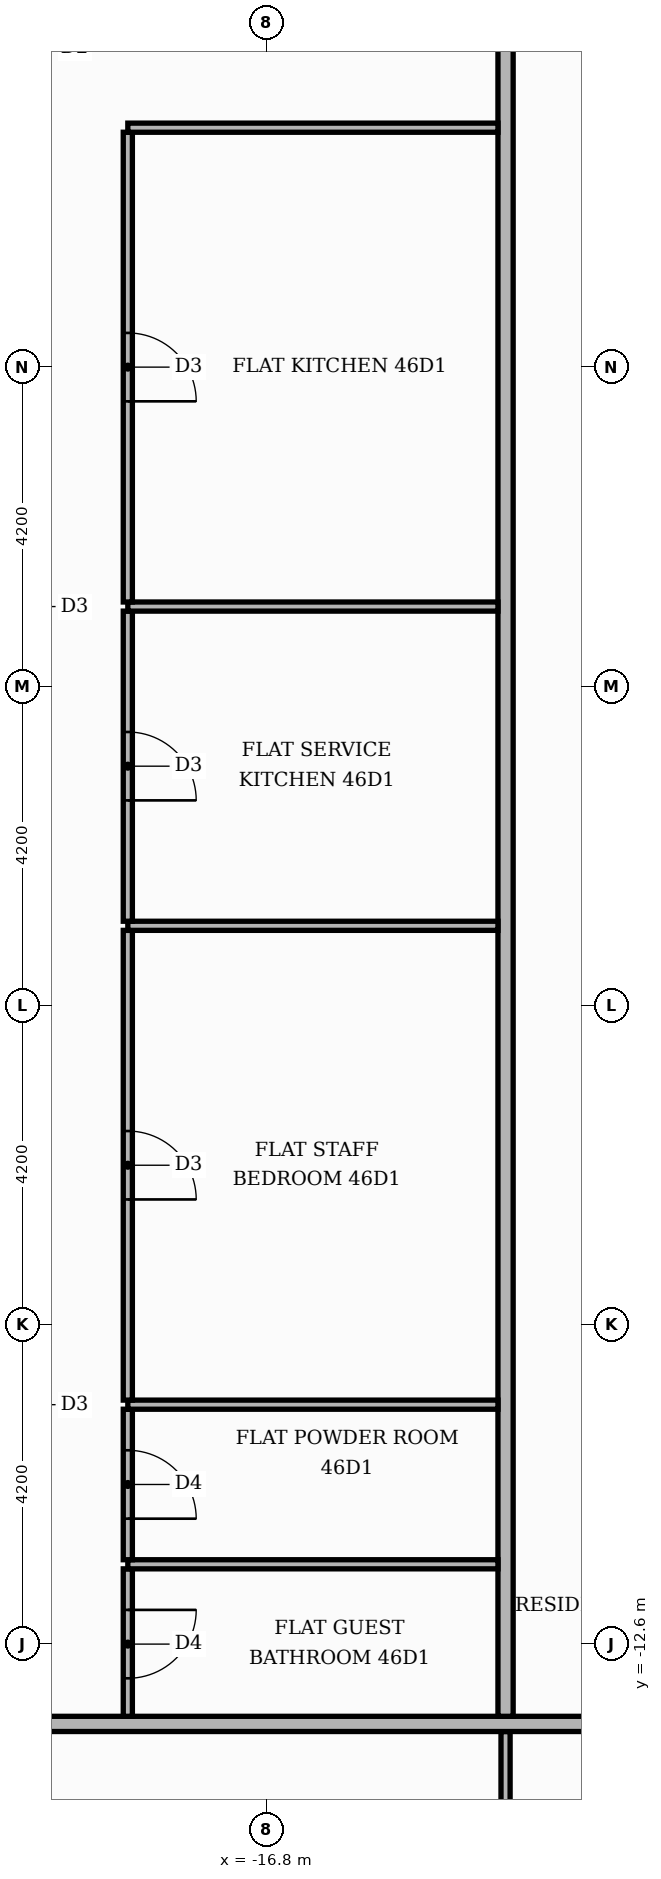
"""IFC4 building model, lengths in metres.
Left out: names, types, materials, properties, quantities, classifications, styles, units other than length and angle.
Written with IfcOpenShell. Run it as: python <this file> out.ifc"""

import sys

from ifc_helpers import new_model, si_unit, direction, frame, frame_2d, origin, place, context, subcontext, project, spatial, rectangle, extrude, element, fill, save


model = new_model("IFC4")
c1 = context("Model", 3, precision=1e-05, world=origin(), true_north=direction((0.0, 1.0)))
c2 = subcontext(c1, "Body", "Model", "MODEL_VIEW")
j1 = project(units=[si_unit("LENGTHUNIT", "METRE"), si_unit("PLANEANGLEUNIT", "RADIAN")], contexts=[c1])
p1 = place(None, origin())
s1 = spatial("IfcSite", under=j1, at=p1, CompositionType="ELEMENT")
p2 = place(p1, origin())
s2 = spatial("IfcBuilding", under=s1, at=p2, CompositionType="ELEMENT")
p3 = place(p2, frame((0.0, 0.0, 196.2)))
s3 = spatial("IfcBuildingStorey", under=s2, at=p3, CompositionType="ELEMENT", Elevation=196.2)
p4 = place(p3, frame((-13.65, -20.36, 0.0), z_axis=(0.0, 0.0, 1.0), x_axis=(0.0, 1.0, 0.0)))
e1 = element("IfcWall", 1, at=p4, inside=s3, PredefinedType="PARTITIONING", context=c2, shape_type="SweptSolid", body=[
    extrude(rectangle(XDim=6.61, YDim=0.12, at=frame_2d((3.305, 0.0))), origin(), (0.0, 0.0, 1.0), 3.48),
])
p5 = place(p4, frame((2.825, 0.0, 0.0)))
e2 = element("IfcOpeningElement", 2, at=p5, cuts=e1, PredefinedType="OPENING", context=c2, shape_type="SweptSolid", body=[
    extrude(rectangle(XDim=1.0, YDim=2.1, at=frame_2d((0.5, 1.05))), frame((0.0, 0.07, 0.0), z_axis=(0.0, -1.0, 0.0), x_axis=(1.0, 0.0, 0.0)), (0.0, 0.0, 1.0), 0.14),
])
p6 = place(p3, frame((-25.42, -13.65, 0.0), z_axis=(0.0, 0.0, 1.0), x_axis=(1.0, 0.0, 0.0)))
e3 = element("IfcWall", 3, at=p6, inside=s3, PredefinedType="PARTITIONING", context=c2, shape_type="SweptSolid", body=[
    extrude(rectangle(XDim=39.07, YDim=0.2, at=frame_2d((19.535, 0.0))), origin(), (0.0, 0.0, 1.0), 3.48),
])
p7 = place(p6, frame((14.37, 0.0, 0.0)))
e4 = element("IfcOpeningElement", 4, at=p7, cuts=e3, PredefinedType="OPENING", context=c2, shape_type="SweptSolid", body=[
    extrude(rectangle(XDim=1.1, YDim=2.4, at=frame_2d((0.55, 1.2))), frame((0.0, 0.11, 0.0), z_axis=(0.0, -1.0, 0.0), x_axis=(1.0, 0.0, 0.0)), (0.0, 0.0, 1.0), 0.22),
])
p8 = place(p3, frame((-18.62, -13.55, 0.0), z_axis=(0.0, 0.0, 1.0), x_axis=(0.0, 1.0, 0.0)))
e5 = element("IfcWall", 5, at=p8, inside=s3, PredefinedType="PARTITIONING", context=c2, shape_type="SweptSolid", body=[
    extrude(rectangle(XDim=1.94, YDim=0.12, at=frame_2d((0.97, 0.0))), origin(), (0.0, 0.0, 1.0), 3.48),
])
p9 = place(p8, frame((0.5, 0.0, 0.0)))
e6 = element("IfcOpeningElement", 6, at=p9, cuts=e5, PredefinedType="OPENING", context=c2, shape_type="SweptSolid", body=[
    extrude(rectangle(XDim=0.9, YDim=2.1, at=frame_2d((0.45, 1.05))), frame((0.0, 0.07, 0.0), z_axis=(0.0, -1.0, 0.0), x_axis=(1.0, 0.0, 0.0)), (0.0, 0.0, 1.0), 0.14),
])
p10 = place(p3, frame((-13.65, -13.55, 0.0), z_axis=(0.0, 0.0, 1.0), x_axis=(0.0, 1.0, 0.0)))
e7 = element("IfcWall", 7, at=p10, inside=s3, PredefinedType="PARTITIONING", context=c2, shape_type="SweptSolid", body=[
    extrude(rectangle(XDim=27.1, YDim=0.2, at=frame_2d((13.55, 0.0))), origin(), (0.0, 0.0, 1.0), 3.48),
])
p11 = place(p10, frame((23.5, 0.0, 0.0)))
e8 = element("IfcOpeningElement", 8, at=p11, cuts=e7, PredefinedType="OPENING", context=c2, shape_type="SweptSolid", body=[
    extrude(rectangle(XDim=1.1, YDim=2.4, at=frame_2d((0.55, 1.2))), frame((0.0, 0.11, 0.0), z_axis=(0.0, -1.0, 0.0), x_axis=(1.0, 0.0, 0.0)), (0.0, 0.0, 1.0), 0.22),
])
p12 = place(p3, frame((-18.62, -11.55, 0.0), z_axis=(0.0, 0.0, 1.0), x_axis=(1.0, 0.0, 0.0)))
e9 = element("IfcWall", 9, at=p12, inside=s3, PredefinedType="PARTITIONING", context=c2, shape_type="SweptSolid", body=[
    extrude(rectangle(XDim=4.87, YDim=0.12, at=frame_2d((2.435, 0.0))), origin(), (0.0, 0.0, 1.0), 3.48),
])
p13 = place(p3, frame((-18.62, -11.49, 0.0), z_axis=(0.0, 0.0, 1.0), x_axis=(0.0, 1.0, 0.0)))
e10 = element("IfcWall", 10, at=p13, inside=s3, PredefinedType="PARTITIONING", context=c2, shape_type="SweptSolid", body=[
    extrude(rectangle(XDim=1.98, YDim=0.12, at=frame_2d((0.99, 0.0))), origin(), (0.0, 0.0, 1.0), 3.48),
])
p14 = place(p13, frame((0.54, 0.0, 0.0)))
e11 = element("IfcOpeningElement", 11, at=p14, cuts=e10, PredefinedType="OPENING", context=c2, shape_type="SweptSolid", body=[
    extrude(rectangle(XDim=0.9, YDim=2.1, at=frame_2d((0.45, 1.05))), frame((0.0, 0.07, 0.0), z_axis=(0.0, -1.0, 0.0), x_axis=(1.0, 0.0, 0.0)), (0.0, 0.0, 1.0), 0.14),
])
p15 = place(p3, frame((-18.62, -9.45, 0.0), z_axis=(0.0, 0.0, 1.0), x_axis=(1.0, 0.0, 0.0)))
e12 = element("IfcWall", 12, at=p15, inside=s3, PredefinedType="PARTITIONING", context=c2, shape_type="SweptSolid", body=[
    extrude(rectangle(XDim=4.87, YDim=0.12, at=frame_2d((2.435, 0.0))), origin(), (0.0, 0.0, 1.0), 3.48),
])
p16 = place(p3, frame((-18.62, -9.39, 0.0), z_axis=(0.0, 0.0, 1.0), x_axis=(0.0, 1.0, 0.0)))
e13 = element("IfcWall", 13, at=p16, inside=s3, PredefinedType="PARTITIONING", context=c2, shape_type="SweptSolid", body=[
    extrude(rectangle(XDim=6.18, YDim=0.12, at=frame_2d((3.09, 0.0))), origin(), (0.0, 0.0, 1.0), 3.48),
])
p17 = place(p16, frame((2.64, 0.0, 0.0)))
e14 = element("IfcOpeningElement", 14, at=p17, cuts=e13, PredefinedType="OPENING", context=c2, shape_type="SweptSolid", body=[
    extrude(rectangle(XDim=0.9, YDim=2.1, at=frame_2d((0.45, 1.05))), frame((0.0, 0.07, 0.0), z_axis=(0.0, -1.0, 0.0), x_axis=(1.0, 0.0, 0.0)), (0.0, 0.0, 1.0), 0.14),
])
p18 = place(p3, frame((-18.62, -3.15, 0.0), z_axis=(0.0, 0.0, 1.0), x_axis=(1.0, 0.0, 0.0)))
e15 = element("IfcWall", 15, at=p18, inside=s3, PredefinedType="PARTITIONING", context=c2, shape_type="SweptSolid", body=[
    extrude(rectangle(XDim=4.87, YDim=0.12, at=frame_2d((2.435, 0.0))), origin(), (0.0, 0.0, 1.0), 3.48),
])
p19 = place(p3, frame((-18.62, -3.09, 0.0), z_axis=(0.0, 0.0, 1.0), x_axis=(0.0, 1.0, 0.0)))
e16 = element("IfcWall", 16, at=p19, inside=s3, PredefinedType="PARTITIONING", context=c2, shape_type="SweptSolid", body=[
    extrude(rectangle(XDim=4.08, YDim=0.12, at=frame_2d((2.04, 0.0))), origin(), (0.0, 0.0, 1.0), 3.48),
])
p20 = place(p19, frame((1.59, 0.0, 0.0)))
e17 = element("IfcOpeningElement", 17, at=p20, cuts=e16, PredefinedType="OPENING", context=c2, shape_type="SweptSolid", body=[
    extrude(rectangle(XDim=0.9, YDim=2.1, at=frame_2d((0.45, 1.05))), frame((0.0, 0.07, 0.0), z_axis=(0.0, -1.0, 0.0), x_axis=(1.0, 0.0, 0.0)), (0.0, 0.0, 1.0), 0.14),
])
p21 = place(p3, frame((-18.62, 1.05, 0.0), z_axis=(0.0, 0.0, 1.0), x_axis=(1.0, 0.0, 0.0)))
e18 = element("IfcWall", 18, at=p21, inside=s3, PredefinedType="PARTITIONING", context=c2, shape_type="SweptSolid", body=[
    extrude(rectangle(XDim=4.87, YDim=0.12, at=frame_2d((2.435, 0.0))), origin(), (0.0, 0.0, 1.0), 3.48),
])
p22 = place(p3, frame((-18.62, 1.11, 0.0), z_axis=(0.0, 0.0, 1.0), x_axis=(0.0, 1.0, 0.0)))
e19 = element("IfcWall", 19, at=p22, inside=s3, PredefinedType="PARTITIONING", context=c2, shape_type="SweptSolid", body=[
    extrude(rectangle(XDim=6.18, YDim=0.12, at=frame_2d((3.09, 0.0))), origin(), (0.0, 0.0, 1.0), 3.48),
])
p23 = place(p22, frame((2.64, 0.0, 0.0)))
e20 = element("IfcOpeningElement", 20, at=p23, cuts=e19, PredefinedType="OPENING", context=c2, shape_type="SweptSolid", body=[
    extrude(rectangle(XDim=0.9, YDim=2.1, at=frame_2d((0.45, 1.05))), frame((0.0, 0.07, 0.0), z_axis=(0.0, -1.0, 0.0), x_axis=(1.0, 0.0, 0.0)), (0.0, 0.0, 1.0), 0.14),
])
p24 = place(p3, frame((-18.62, 7.35, 0.0), z_axis=(0.0, 0.0, 1.0), x_axis=(1.0, 0.0, 0.0)))
e21 = element("IfcWall", 21, at=p24, inside=s3, PredefinedType="PARTITIONING", context=c2, shape_type="SweptSolid", body=[
    extrude(rectangle(XDim=4.87, YDim=0.12, at=frame_2d((2.435, 0.0))), origin(), (0.0, 0.0, 1.0), 3.48),
])
p25 = place(p23, frame((0.9, 0.0, 0.0), z_axis=(0.0, 0.0, 1.0), x_axis=(-1.0, 0.0, 0.0)))
e22 = element("IfcDoor", 22, at=p25, inside=s3, OperationType="SINGLE_SWING_LEFT", PredefinedType="DOOR", context=c2, shape_type="SweptSolid", body=[
    extrude(rectangle(XDim=0.9, YDim=2.1, at=frame_2d((0.45, 1.05))), frame((0.0, 0.025, 0.0), z_axis=(0.0, -1.0, 0.0), x_axis=(1.0, 0.0, 0.0)), (0.0, 0.0, 1.0), 0.05),
])
fill(e20, e22)
p26 = place(p20, frame((0.9, 0.0, 0.0), z_axis=(0.0, 0.0, 1.0), x_axis=(-1.0, 0.0, 0.0)))
e23 = element("IfcDoor", 23, at=p26, inside=s3, OperationType="SINGLE_SWING_LEFT", PredefinedType="DOOR", context=c2, shape_type="SweptSolid", body=[
    extrude(rectangle(XDim=0.9, YDim=2.1, at=frame_2d((0.45, 1.05))), frame((0.0, 0.025, 0.0), z_axis=(0.0, -1.0, 0.0), x_axis=(1.0, 0.0, 0.0)), (0.0, 0.0, 1.0), 0.05),
])
fill(e17, e23)
p27 = place(p17, frame((0.9, 0.0, 0.0), z_axis=(0.0, 0.0, 1.0), x_axis=(-1.0, 0.0, 0.0)))
e24 = element("IfcDoor", 24, at=p27, inside=s3, OperationType="SINGLE_SWING_LEFT", PredefinedType="DOOR", context=c2, shape_type="SweptSolid", body=[
    extrude(rectangle(XDim=0.9, YDim=2.1, at=frame_2d((0.45, 1.05))), frame((0.0, 0.025, 0.0), z_axis=(0.0, -1.0, 0.0), x_axis=(1.0, 0.0, 0.0)), (0.0, 0.0, 1.0), 0.05),
])
fill(e14, e24)
p28 = place(p14, frame((0.9, 0.0, 0.0), z_axis=(0.0, 0.0, 1.0), x_axis=(-1.0, 0.0, 0.0)))
e25 = element("IfcDoor", 25, at=p28, inside=s3, OperationType="SINGLE_SWING_LEFT", PredefinedType="DOOR", context=c2, shape_type="SweptSolid", body=[
    extrude(rectangle(XDim=0.9, YDim=2.1, at=frame_2d((0.45, 1.05))), frame((0.0, 0.025, 0.0), z_axis=(0.0, -1.0, 0.0), x_axis=(1.0, 0.0, 0.0)), (0.0, 0.0, 1.0), 0.05),
])
fill(e11, e25)
p29 = place(p9, frame((0.9, 0.0, 0.0), z_axis=(0.0, 0.0, 1.0), x_axis=(-1.0, 0.0, 0.0)))
e26 = element("IfcDoor", 26, at=p29, inside=s3, OperationType="SINGLE_SWING_RIGHT", PredefinedType="DOOR", context=c2, shape_type="SweptSolid", body=[
    extrude(rectangle(XDim=0.9, YDim=2.1, at=frame_2d((0.45, 1.05))), frame((0.0, 0.025, 0.0), z_axis=(0.0, -1.0, 0.0), x_axis=(1.0, 0.0, 0.0)), (0.0, 0.0, 1.0), 0.05),
])
fill(e6, e26)
save(model, sys.argv[1])
